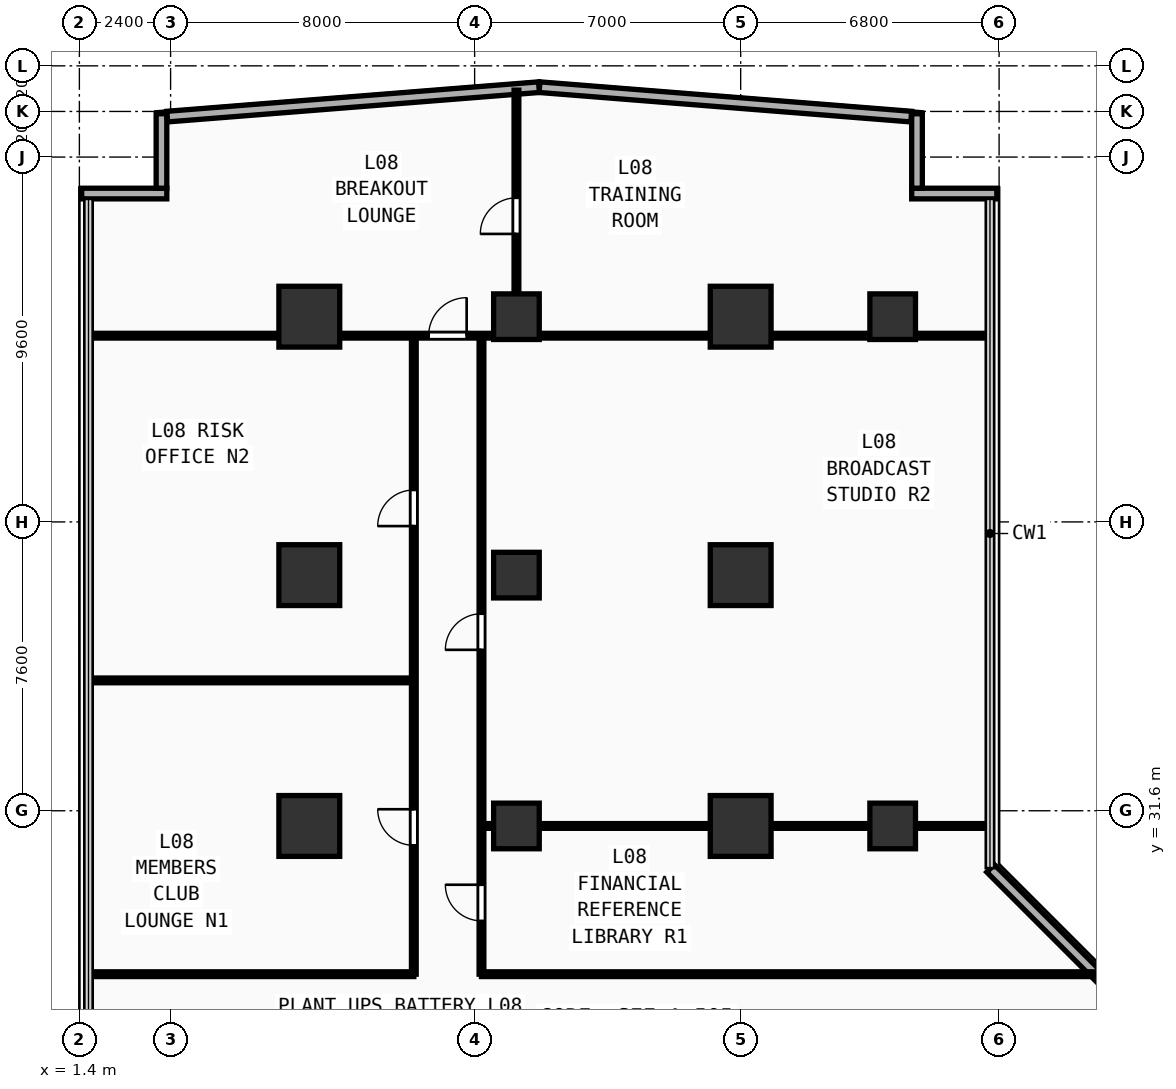
"""IFC4 building model, lengths in metres.
Left out: names, types, materials, properties, quantities, classifications, styles, units other than length and angle.
Written with IfcOpenShell. Run it as: python <this file> out.ifc"""

import sys

from ifc_helpers import new_model, si_unit, direction, frame, frame_2d, origin, origin_2d, place, context, subcontext, project, spatial, rectangle, extrude, element, fill, save


model = new_model("IFC4")
c1 = context("Model", 3, precision=1e-05, world=origin(), true_north=direction((0.0, 1.0)))
c2 = subcontext(c1, "Body", "Model", "MODEL_VIEW")
j1 = project(units=[si_unit("LENGTHUNIT", "METRE"), si_unit("PLANEANGLEUNIT", "RADIAN")], contexts=[c1])
p1 = place(None, origin())
s1 = spatial("IfcSite", under=j1, at=p1, CompositionType="ELEMENT")
p2 = place(p1, origin())
s2 = spatial("IfcBuilding", under=s1, at=p2, CompositionType="ELEMENT")
p3 = place(p2, frame((0.0, 0.0, 33.4)))
s3 = spatial("IfcBuildingStorey", under=s2, at=p3, CompositionType="ELEMENT", Elevation=33.4)
for number, where, z_axis, x_axis in (
    (1, (7.45, 31.2, 0.0), (0.0, 0.0, 1.0), (1.0, 0.0, 0.0)),
    (2, (7.45, 37.8, 0.0), (0.0, 0.0, 1.0), (1.0, 0.0, 0.0)),
    (3, (7.45, 44.6, 0.0), (0.0, 0.0, 1.0), (1.0, 0.0, 0.0)),
    (4, (18.8, 31.2, 0.0), (0.0, 0.0, 1.0), (1.0, 0.0, 0.0)),
    (5, (18.8, 37.8, 0.0), (0.0, 0.0, 1.0), (1.0, 0.0, 0.0)),
    (6, (18.8, 44.6, 0.0), (0.0, 0.0, 1.0), (1.0, 0.0, 0.0)),
):
    element("IfcColumn", number, at=place(p3, frame(where, z_axis=z_axis, x_axis=x_axis)), inside=s3, PredefinedType="COLUMN", context=c2, shape_type="SweptSolid", body=[
        extrude(rectangle(XDim=1.6, YDim=1.6, at=origin_2d()), origin(), (0.0, 0.0, 1.0), 3.54),
    ])
for number, where, z_axis, x_axis in (
    (7, (22.8, 31.2, 0.0), (0.0, 0.0, 1.0), (1.0, 0.0, 0.0)),
    (8, (22.8, 44.6, 0.0), (0.0, 0.0, 1.0), (1.0, 0.0, 0.0)),
    (9, (12.9, 31.2, 0.0), (0.0, 0.0, 1.0), (1.0, 0.0, 0.0)),
    (10, (12.9, 37.8, 0.0), (0.0, 0.0, 1.0), (1.0, 0.0, 0.0)),
    (11, (12.9, 44.6, 0.0), (0.0, 0.0, 1.0), (1.0, 0.0, 0.0)),
):
    element("IfcColumn", number, at=place(p3, frame(where, z_axis=z_axis, x_axis=x_axis)), inside=s3, PredefinedType="COLUMN", context=c2, shape_type="SweptSolid", body=[
        extrude(rectangle(XDim=1.2, YDim=1.2, at=origin_2d()), origin(), (0.0, 0.0, 1.0), 3.54),
    ])
p4 = place(p3, frame((23.3, 47.84, 0.0), z_axis=(0.0, 0.0, 1.0), x_axis=(1.0, 0.0, 0.0)))
e12 = element("IfcWall", 12, at=p4, inside=s3, PredefinedType="SOLIDWALL", context=c2, shape_type="SweptSolid", body=[
    extrude(rectangle(XDim=2.24, YDim=0.28, at=frame_2d((1.12, 0.0))), origin(), (0.0, 0.0, 1.0), 3.54),
])
p5 = place(p3, frame((23.44, 47.98, 0.0), z_axis=(0.0, 0.0, 1.0), x_axis=(0.0, 1.0, 0.0)))
e13 = element("IfcWall", 13, at=p5, inside=s3, PredefinedType="SOLIDWALL", context=c2, shape_type="SweptSolid", body=[
    extrude(rectangle(XDim=1.96, YDim=0.28, at=frame_2d((0.98, 0.0))), origin(), (0.0, 0.0, 1.0), 3.54),
])
p6 = place(p3, frame((1.46, 47.84, 0.0), z_axis=(0.0, 0.0, 1.0), x_axis=(1.0, 0.0, 0.0)))
e14 = element("IfcWall", 14, at=p6, inside=s3, PredefinedType="SOLIDWALL", context=c2, shape_type="SweptSolid", body=[
    extrude(rectangle(XDim=2.24, YDim=0.28, at=frame_2d((1.12, 0.0))), origin(), (0.0, 0.0, 1.0), 3.54),
])
p7 = place(p3, frame((3.56, 47.98, 0.0), z_axis=(0.0, 0.0, 1.0), x_axis=(0.0, 1.0, 0.0)))
e15 = element("IfcWall", 15, at=p7, inside=s3, PredefinedType="SOLIDWALL", context=c2, shape_type="SweptSolid", body=[
    extrude(rectangle(XDim=1.96, YDim=0.28, at=frame_2d((0.98, 0.0))), origin(), (0.0, 0.0, 1.0), 3.54),
])
p8 = place(p3, frame((31.885, 23.575, 0.0), z_axis=(0.0, 0.0, 1.0), x_axis=(-0.707106781187, 0.707106781187, 0.0)))
e16 = element("IfcWall", 16, at=p8, inside=s3, PredefinedType="SOLIDWALL", context=c2, shape_type="SweptSolid", body=[
    extrude(rectangle(XDim=9.207, YDim=0.28, at=frame_2d((4.603, 0.0))), origin(), (0.0, 0.0, 1.0), 3.54),
])
for number, where, z_axis, x_axis in (
    (17, (23.288, 49.864, 0.0), (0.0, 0.0, 1.0), (-0.997, 0.079, 0.0)),
    (18, (13.493, 50.639, 0.0), (0.0, 0.0, 1.0), (-0.997, -0.079, 0.0)),
):
    element("IfcWall", number, at=place(p3, frame(where, z_axis=z_axis, x_axis=x_axis)), inside=s3, PredefinedType="SOLIDWALL", context=c2, shape_type="SweptSolid", body=[
        extrude(rectangle(XDim=9.812, YDim=0.28, at=frame_2d((4.906, 0.0))), origin(), (0.0, 0.0, 1.0), 3.54),
    ])
p9 = place(p3, frame((1.64, 27.3, 0.0), z_axis=(0.0, 0.0, 1.0), x_axis=(1.0, 0.0, 0.0)))
e19 = element("IfcWall", 19, at=p9, inside=s3, PredefinedType="PARTITIONING", context=c2, shape_type="SweptSolid", body=[
    extrude(rectangle(XDim=8.56, YDim=0.125, at=frame_2d((4.28, 0.0))), origin(), (0.0, 0.0, 1.0), 3.54),
])
p10 = place(p3, frame((10.2, 27.3, 0.0), z_axis=(0.0, 0.0, 1.0), x_axis=(0.0, 1.0, 0.0)))
e20 = element("IfcWall", 20, at=p10, inside=s3, PredefinedType="PARTITIONING", context=c2, shape_type="SweptSolid", body=[
    extrude(rectangle(XDim=16.8, YDim=0.125, at=frame_2d((8.4, 0.0))), origin(), (0.0, 0.0, 1.0), 3.54),
])
p11 = place(p10, frame((3.39, 0.0, 0.0)))
e21 = element("IfcOpeningElement", 21, at=p11, cuts=e20, PredefinedType="OPENING", context=c2, shape_type="SweptSolid", body=[
    extrude(rectangle(XDim=0.95, YDim=2.15, at=frame_2d((0.475, 1.075))), frame((0.0, 0.073, 0.0), z_axis=(0.0, -1.0, 0.0), x_axis=(1.0, 0.0, 0.0)), (0.0, 0.0, 1.0), 0.145),
])
p12 = place(p10, frame((11.79, 0.0, 0.0)))
e22 = element("IfcOpeningElement", 22, at=p12, cuts=e20, PredefinedType="OPENING", context=c2, shape_type="SweptSolid", body=[
    extrude(rectangle(XDim=0.95, YDim=2.15, at=frame_2d((0.475, 1.075))), frame((0.0, 0.073, 0.0), z_axis=(0.0, -1.0, 0.0), x_axis=(1.0, 0.0, 0.0)), (0.0, 0.0, 1.0), 0.145),
])
p13 = place(p3, frame((1.64, 35.03, 0.0), z_axis=(0.0, 0.0, 1.0), x_axis=(1.0, 0.0, 0.0)))
e23 = element("IfcWall", 23, at=p13, inside=s3, PredefinedType="PARTITIONING", context=c2, shape_type="SweptSolid", body=[
    extrude(rectangle(XDim=8.56, YDim=0.125, at=frame_2d((4.28, 0.0))), origin(), (0.0, 0.0, 1.0), 3.54),
])
p14 = place(p3, frame((1.64, 44.1, 0.0), z_axis=(0.0, 0.0, 1.0), x_axis=(1.0, 0.0, 0.0)))
e24 = element("IfcWall", 24, at=p14, inside=s3, PredefinedType="PARTITIONING", context=c2, shape_type="SweptSolid", body=[
    extrude(rectangle(XDim=23.72, YDim=0.125, at=frame_2d((11.86, 0.0))), origin(), (0.0, 0.0, 1.0), 3.54),
])
p15 = place(p14, frame((8.95, 0.0, 0.0)))
e25 = element("IfcOpeningElement", 25, at=p15, cuts=e24, PredefinedType="OPENING", context=c2, shape_type="SweptSolid", body=[
    extrude(rectangle(XDim=1.0, YDim=2.2, at=frame_2d((0.5, 1.1))), frame((0.0, 0.073, 0.0), z_axis=(0.0, -1.0, 0.0), x_axis=(1.0, 0.0, 0.0)), (0.0, 0.0, 1.0), 0.145),
])
p16 = place(p3, frame((12.9, 44.1, 0.0), z_axis=(0.0, 0.0, 1.0), x_axis=(0.0, 1.0, 0.0)))
e26 = element("IfcWall", 26, at=p16, inside=s3, PredefinedType="PARTITIONING", context=c2, shape_type="SweptSolid", body=[
    extrude(rectangle(XDim=6.46, YDim=0.125, at=frame_2d((3.23, 0.0))), origin(), (0.0, 0.0, 1.0), 2.94),
])
p17 = place(p16, frame((2.677, 0.0, 0.0)))
e27 = element("IfcOpeningElement", 27, at=p17, cuts=e26, PredefinedType="OPENING", context=c2, shape_type="SweptSolid", body=[
    extrude(rectangle(XDim=0.95, YDim=2.15, at=frame_2d((0.475, 1.075))), frame((0.0, 0.073, 0.0), z_axis=(0.0, -1.0, 0.0), x_axis=(1.0, 0.0, 0.0)), (0.0, 0.0, 1.0), 0.145),
])
p18 = place(p3, frame((11.98, 27.3, 0.0), z_axis=(0.0, 0.0, 1.0), x_axis=(1.0, 0.0, 0.0)))
e28 = element("IfcWall", 28, at=p18, inside=s3, PredefinedType="PARTITIONING", context=c2, shape_type="SweptSolid", body=[
    extrude(rectangle(XDim=16.28, YDim=0.125, at=frame_2d((8.14, 0.0))), origin(), (0.0, 0.0, 1.0), 3.54),
])
p19 = place(p3, frame((11.98, 27.3, 0.0), z_axis=(0.0, 0.0, 1.0), x_axis=(0.0, 1.0, 0.0)))
e29 = element("IfcWall", 29, at=p19, inside=s3, PredefinedType="PARTITIONING", context=c2, shape_type="SweptSolid", body=[
    extrude(rectangle(XDim=16.8, YDim=0.125, at=frame_2d((8.4, 0.0))), origin(), (0.0, 0.0, 1.0), 3.54),
])
p20 = place(p19, frame((1.403, 0.0, 0.0)))
e30 = element("IfcOpeningElement", 30, at=p20, cuts=e29, PredefinedType="OPENING", context=c2, shape_type="SweptSolid", body=[
    extrude(rectangle(XDim=0.95, YDim=2.15, at=frame_2d((0.475, 1.075))), frame((0.0, 0.073, 0.0), z_axis=(0.0, -1.0, 0.0), x_axis=(1.0, 0.0, 0.0)), (0.0, 0.0, 1.0), 0.145),
])
p21 = place(p19, frame((8.534, 0.0, 0.0)))
e31 = element("IfcOpeningElement", 31, at=p21, cuts=e29, PredefinedType="OPENING", context=c2, shape_type="SweptSolid", body=[
    extrude(rectangle(XDim=0.95, YDim=2.15, at=frame_2d((0.475, 1.075))), frame((0.0, 0.073, 0.0), z_axis=(0.0, -1.0, 0.0), x_axis=(1.0, 0.0, 0.0)), (0.0, 0.0, 1.0), 0.145),
])
p22 = place(p3, frame((11.98, 31.2, 0.0), z_axis=(0.0, 0.0, 1.0), x_axis=(1.0, 0.0, 0.0)))
e32 = element("IfcWall", 32, at=p22, inside=s3, PredefinedType="PARTITIONING", context=c2, shape_type="SweptSolid", body=[
    extrude(rectangle(XDim=13.38, YDim=0.125, at=frame_2d((6.69, 0.0))), origin(), (0.0, 0.0, 1.0), 2.94),
])
p23 = place(p11, origin())
e33 = element("IfcDoor", 33, at=p23, inside=s3, OperationType="SINGLE_SWING_RIGHT", PredefinedType="DOOR", context=c2, shape_type="SweptSolid", body=[
    extrude(rectangle(XDim=0.95, YDim=2.15, at=frame_2d((0.475, 1.075))), frame((0.0, 0.025, 0.0), z_axis=(0.0, -1.0, 0.0), x_axis=(1.0, 0.0, 0.0)), (0.0, 0.0, 1.0), 0.05),
])
fill(e21, e33)
p24 = place(p12, origin())
e34 = element("IfcDoor", 34, at=p24, inside=s3, OperationType="SINGLE_SWING_LEFT", PredefinedType="DOOR", context=c2, shape_type="SweptSolid", body=[
    extrude(rectangle(XDim=0.95, YDim=2.15, at=frame_2d((0.475, 1.075))), frame((0.0, 0.025, 0.0), z_axis=(0.0, -1.0, 0.0), x_axis=(1.0, 0.0, 0.0)), (0.0, 0.0, 1.0), 0.05),
])
fill(e22, e34)
p25 = place(p15, origin())
e35 = element("IfcDoor", 35, at=p25, inside=s3, OperationType="SINGLE_SWING_RIGHT", PredefinedType="DOOR", context=c2, shape_type="SweptSolid", body=[
    extrude(rectangle(XDim=1.0, YDim=2.2, at=frame_2d((0.5, 1.1))), frame((0.0, 0.025, 0.0), z_axis=(0.0, -1.0, 0.0), x_axis=(1.0, 0.0, 0.0)), (0.0, 0.0, 1.0), 0.05),
])
fill(e25, e35)
p26 = place(p17, origin())
e36 = element("IfcDoor", 36, at=p26, inside=s3, OperationType="SINGLE_SWING_LEFT", PredefinedType="DOOR", context=c2, shape_type="SweptSolid", body=[
    extrude(rectangle(XDim=0.95, YDim=2.15, at=frame_2d((0.475, 1.075))), frame((0.0, 0.025, 0.0), z_axis=(0.0, -1.0, 0.0), x_axis=(1.0, 0.0, 0.0)), (0.0, 0.0, 1.0), 0.05),
])
fill(e27, e36)
p27 = place(p20, origin())
e37 = element("IfcDoor", 37, at=p27, inside=s3, OperationType="SINGLE_SWING_RIGHT", PredefinedType="DOOR", context=c2, shape_type="SweptSolid", body=[
    extrude(rectangle(XDim=0.95, YDim=2.15, at=frame_2d((0.475, 1.075))), frame((0.0, 0.025, 0.0), z_axis=(0.0, -1.0, 0.0), x_axis=(1.0, 0.0, 0.0)), (0.0, 0.0, 1.0), 0.05),
])
fill(e30, e37)
p28 = place(p21, origin())
e38 = element("IfcDoor", 38, at=p28, inside=s3, OperationType="SINGLE_SWING_LEFT", PredefinedType="DOOR", context=c2, shape_type="SweptSolid", body=[
    extrude(rectangle(XDim=0.95, YDim=2.15, at=frame_2d((0.475, 1.075))), frame((0.0, 0.025, 0.0), z_axis=(0.0, -1.0, 0.0), x_axis=(1.0, 0.0, 0.0)), (0.0, 0.0, 1.0), 0.05),
])
fill(e31, e38)
save(model, sys.argv[1])
